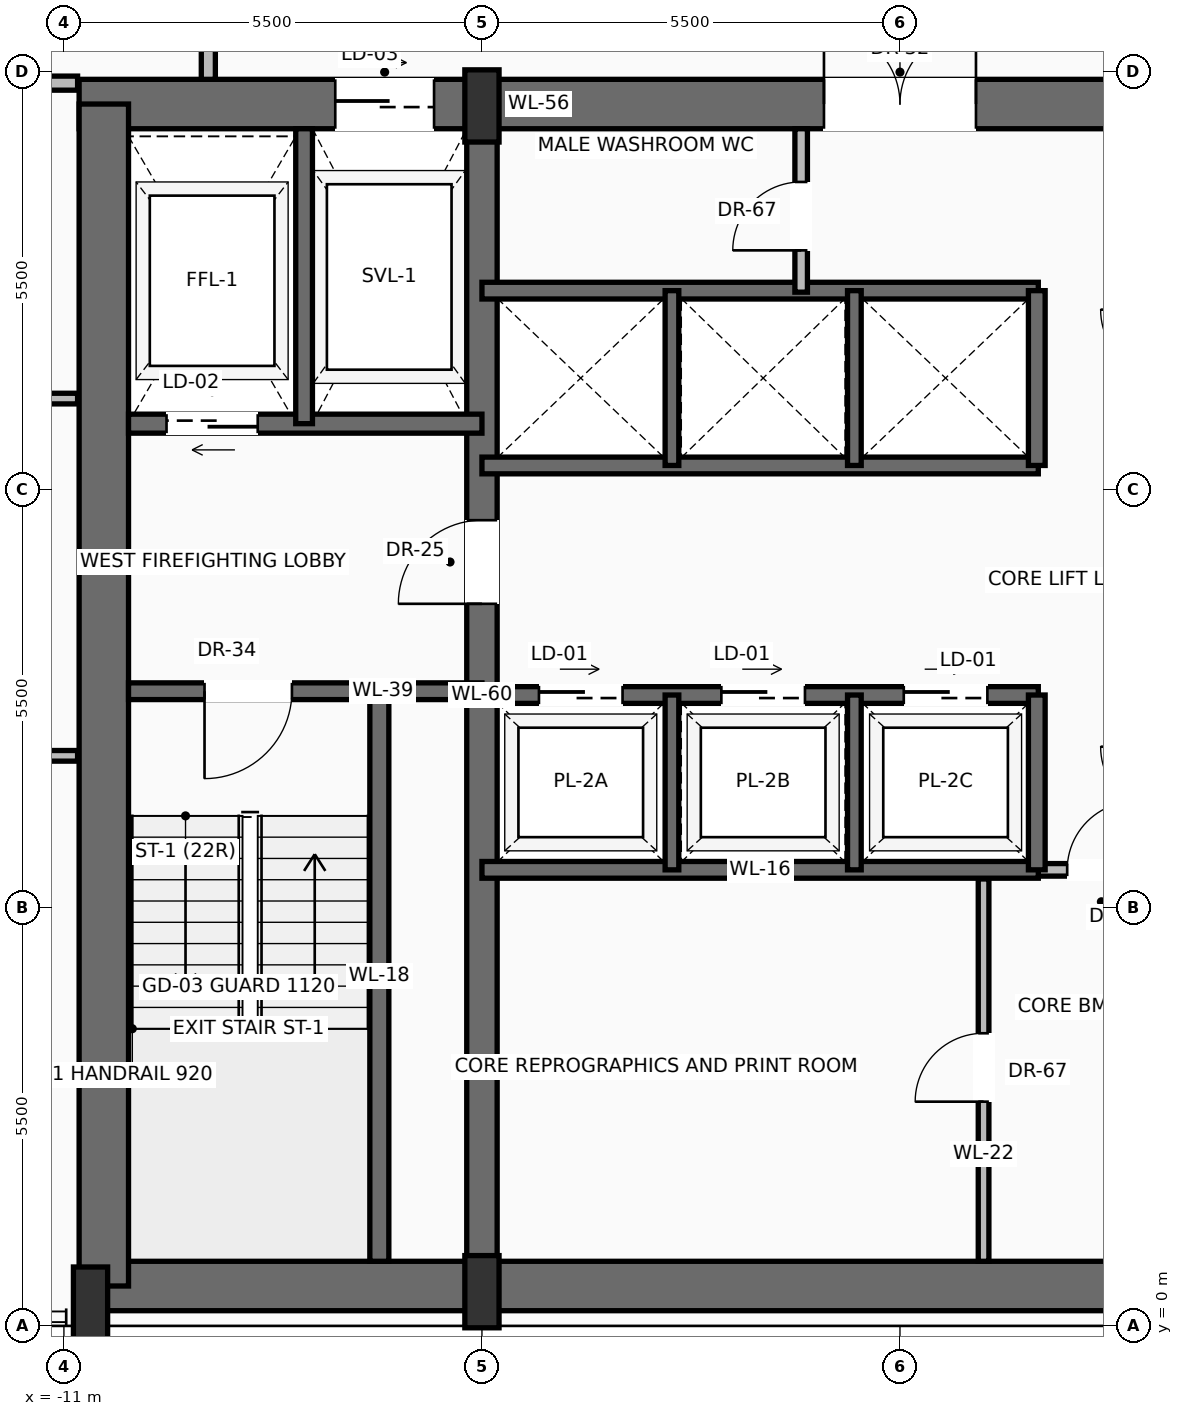
"""IFC4 building model, lengths in metres.
Left out: names, types, materials, properties, quantities, classifications, styles, units other than length and angle.
Written with IfcOpenShell. Run it as: python <this file> out.ifc"""

import sys

from ifc_helpers import new_model, si_unit, direction, frame, frame_2d, origin, origin_2d, place, context, subcontext, project, spatial, rectangle, extrude, source, transform, mapped, element, fill, save


model = new_model("IFC4")
c1 = context("Model", 3, precision=1e-05, world=origin(), true_north=direction((0.0, 1.0)))
c2 = subcontext(c1, "Body", "Model", "MODEL_VIEW")
j1 = project(units=[si_unit("LENGTHUNIT", "METRE"), si_unit("PLANEANGLEUNIT", "RADIAN")], contexts=[c1])
p1 = place(None, origin())
s1 = spatial("IfcSite", under=j1, at=p1, CompositionType="ELEMENT")
p2 = place(p1, origin())
s2 = spatial("IfcBuilding", under=s1, at=p2, CompositionType="ELEMENT")
p3 = place(p2, frame((0.0, 0.0, 147.8)))
s3 = spatial("IfcBuildingStorey", under=s2, at=p3, CompositionType="ELEMENT", Elevation=147.8)
p4 = place(p3, frame((-10.65, 0.525, 0.0), z_axis=(0.0, 0.0, 1.0), x_axis=(1.0, 0.0, 0.0)))
e1 = element("IfcWall", 1, at=p4, inside=s3, PredefinedType="SHEAR", context=c2, shape_type="SweptSolid", body=[
    extrude(rectangle(XDim=21.3, YDim=0.65, at=frame_2d((10.65, 0.0))), origin(), (0.0, 0.0, 1.0), 3.47),
])
p5 = place(p3, frame((-10.8, 16.075, 0.0), z_axis=(0.0, 0.0, 1.0), x_axis=(1.0, 0.0, 0.0)))
e2 = element("IfcWall", 2, at=p5, inside=s3, PredefinedType="SHEAR", context=c2, shape_type="SweptSolid", body=[
    extrude(rectangle(XDim=21.6, YDim=0.65, at=frame_2d((10.8, 0.0))), origin(), (0.0, 0.0, 1.0), 3.47),
])
p6 = place(p5, frame((3.37, 0.0, 0.0)))
e3 = element("IfcOpeningElement", 3, at=p6, cuts=e2, PredefinedType="OPENING", context=c2, shape_type="SweptSolid", body=[
    extrude(rectangle(XDim=1.3, YDim=2.3, at=frame_2d((0.65, 1.15))), frame((0.0, 0.335, 0.0), z_axis=(0.0, -1.0, 0.0), x_axis=(1.0, 0.0, 0.0)), (0.0, 0.0, 1.0), 0.67),
])
p7 = place(p5, frame((9.8, 0.0, 0.0)))
e4 = element("IfcOpeningElement", 4, at=p7, cuts=e2, PredefinedType="OPENING", context=c2, shape_type="SweptSolid", body=[
    extrude(rectangle(XDim=2.0, YDim=2.4, at=frame_2d((1.0, 1.2))), frame((0.0, 0.335, 0.0), z_axis=(0.0, -1.0, 0.0), x_axis=(1.0, 0.0, 0.0)), (0.0, 0.0, 1.0), 0.67),
])
p8 = place(p3, frame((-10.475, 0.525, 0.0), z_axis=(0.0, 0.0, 1.0), x_axis=(0.0, 1.0, 0.0)))
e5 = element("IfcWall", 5, at=p8, inside=s3, PredefinedType="SHEAR", context=c2, shape_type="SweptSolid", body=[
    extrude(rectangle(XDim=15.55, YDim=0.65, at=frame_2d((7.775, 0.0))), origin(), (0.0, 0.0, 1.0), 3.47),
])
p9 = place(p3, frame((-5.5, 0.525, 0.0), z_axis=(0.0, 0.0, 1.0), x_axis=(0.0, 1.0, 0.0)))
e6 = element("IfcWall", 6, at=p9, inside=s3, PredefinedType="SHEAR", context=c2, shape_type="SweptSolid", body=[
    extrude(rectangle(XDim=15.55, YDim=0.4, at=frame_2d((7.775, 0.0))), origin(), (0.0, 0.0, 1.0), 3.47),
])
p10 = place(p9, frame((8.975, 0.0, 0.0)))
e7 = element("IfcOpeningElement", 7, at=p10, cuts=e6, PredefinedType="OPENING", context=c2, shape_type="SweptSolid", body=[
    extrude(rectangle(XDim=1.1, YDim=2.2, at=frame_2d((0.55, 1.1))), frame((0.0, 0.21, 0.0), z_axis=(0.0, -1.0, 0.0), x_axis=(1.0, 0.0, 0.0)), (0.0, 0.0, 1.0), 0.42),
])
m1 = source(origin(), c2, "Body", "SweptSolid", [
    extrude(rectangle(XDim=0.45, YDim=0.95, at=origin_2d()), origin(), (0.0, 0.0, 1.0), 3.7),
])
for number, where, z_axis, x_axis in (
    (8, (-10.65, 0.3, 0.0), (0.0, 0.0, 1.0), (1.0, 0.0, 0.0)),
    (9, (-5.5, 0.45, 0.0), (0.0, 0.0, 1.0), (1.0, 0.0, 0.0)),
    (10, (-5.5, 16.05, 0.0), (0.0, 0.0, 1.0), (1.0, 0.0, 0.0)),
):
    element("IfcColumn", number, at=place(p3, frame(where, z_axis=z_axis, x_axis=x_axis)), inside=s3, PredefinedType="PILASTER", context=c2, shape_type="MappedRepresentation", body=[
        mapped(m1, transform((0.0, 0.0, 0.0), scale=1.0)),
    ])
p11 = place(p3, frame((-6.85, 0.85, 0.0), z_axis=(0.0, 0.0, 1.0), x_axis=(0.0, 1.0, 0.0)))
e11 = element("IfcWall", 11, at=p11, inside=s3, PredefinedType="SOLIDWALL", context=c2, shape_type="SweptSolid", body=[
    extrude(rectangle(XDim=7.5, YDim=0.25, at=frame_2d((3.75, 0.0))), origin(), (0.0, 0.0, 1.0), 3.47),
])
p12 = place(p3, frame((-5.5, 8.35, 0.0), z_axis=(0.0, 0.0, 1.0), x_axis=(-1.0, 0.0, 0.0)))
e12 = element("IfcWall", 12, at=p12, inside=s3, PredefinedType="SOLIDWALL", context=c2, shape_type="SweptSolid", body=[
    extrude(rectangle(XDim=4.65, YDim=0.22, at=frame_2d((2.325, 0.0))), origin(), (0.0, 0.0, 1.0), 3.47),
])
p13 = place(p12, frame((2.5, 0.0, 0.0)))
e13 = element("IfcOpeningElement", 13, at=p13, cuts=e12, PredefinedType="OPENING", context=c2, shape_type="SweptSolid", body=[
    extrude(rectangle(XDim=1.15, YDim=2.2, at=frame_2d((0.575, 1.1))), frame((0.0, 0.12, 0.0), z_axis=(0.0, -1.0, 0.0), x_axis=(1.0, 0.0, 0.0)), (0.0, 0.0, 1.0), 0.24),
])
p14 = place(p3, frame((-5.5, 11.87, 0.0), z_axis=(0.0, 0.0, 1.0), x_axis=(-1.0, 0.0, 0.0)))
e14 = element("IfcWall", 14, at=p14, inside=s3, PredefinedType="SOLIDWALL", context=c2, shape_type="SweptSolid", body=[
    extrude(rectangle(XDim=4.65, YDim=0.25, at=frame_2d((2.325, 0.0))), origin(), (0.0, 0.0, 1.0), 3.47),
])
p15 = place(p14, frame((2.95, 0.0, 0.0)))
e15 = element("IfcOpeningElement", 15, at=p15, cuts=e14, PredefinedType="OPENING", context=c2, shape_type="SweptSolid", body=[
    extrude(rectangle(XDim=1.2, YDim=2.25, at=frame_2d((0.6, 1.125))), frame((0.0, 0.135, 0.0), z_axis=(0.0, -1.0, 0.0), x_axis=(1.0, 0.0, 0.0)), (0.0, 0.0, 1.0), 0.27),
])
p16 = place(p3, frame((-7.84, 11.87, 0.0), z_axis=(0.0, 0.0, 1.0), x_axis=(0.0, 1.0, 0.0)))
e16 = element("IfcWall", 16, at=p16, inside=s3, PredefinedType="SOLIDWALL", context=c2, shape_type="SweptSolid", body=[
    extrude(rectangle(XDim=3.88, YDim=0.22, at=frame_2d((1.94, 0.0))), origin(), (0.0, 0.0, 1.0), 3.47),
])
p17 = place(p3, frame((1.82, 6.0, 0.0), z_axis=(0.0, 0.0, 1.0), x_axis=(1.0, 0.0, 0.0)))
e17 = element("IfcWall", 17, at=p17, inside=s3, PredefinedType="PARTITIONING", context=c2, shape_type="SweptSolid", body=[
    extrude(rectangle(XDim=3.48, YDim=0.165, at=frame_2d((1.74, 0.0))), origin(), (0.0, 0.0, 1.0), 3.462),
])
p18 = place(p17, frame((0.38, 0.0, 0.0)))
e18 = element("IfcOpeningElement", 18, at=p18, cuts=e17, PredefinedType="OPENING", context=c2, shape_type="SweptSolid", body=[
    extrude(rectangle(XDim=0.9, YDim=2.1, at=frame_2d((0.45, 1.05))), frame((0.0, 0.093, 0.0), z_axis=(0.0, -1.0, 0.0), x_axis=(1.0, 0.0, 0.0)), (0.0, 0.0, 1.0), 0.185),
])
p19 = place(p3, frame((1.1, 0.85, 0.0), z_axis=(0.0, 0.0, 1.0), x_axis=(0.0, 1.0, 0.0)))
e19 = element("IfcWall", 19, at=p19, inside=s3, PredefinedType="PARTITIONING", context=c2, shape_type="SweptSolid", body=[
    extrude(rectangle(XDim=5.03, YDim=0.14, at=frame_2d((2.515, 0.0))), origin(), (0.0, 0.0, 1.0), 3.462),
])
p20 = place(p19, frame((2.1, 0.0, 0.0)))
e20 = element("IfcOpeningElement", 20, at=p20, cuts=e19, PredefinedType="OPENING", context=c2, shape_type="SweptSolid", body=[
    extrude(rectangle(XDim=0.9, YDim=2.1, at=frame_2d((0.45, 1.05))), frame((0.0, 0.08, 0.0), z_axis=(0.0, -1.0, 0.0), x_axis=(1.0, 0.0, 0.0)), (0.0, 0.0, 1.0), 0.16),
])
p21 = place(p3, frame((-5.5, 6.0, 0.0), z_axis=(0.0, 0.0, 1.0), x_axis=(1.0, 0.0, 0.0)))
e21 = element("IfcWall", 21, at=p21, inside=s3, PredefinedType="SOLIDWALL", context=c2, shape_type="SweptSolid", body=[
    extrude(rectangle(XDim=7.32, YDim=0.22, at=frame_2d((3.66, 0.0))), origin(), (0.0, 0.0, 1.0), 3.47),
])
p22 = place(p3, frame((-5.5, 8.3, 0.0), z_axis=(0.0, 0.0, 1.0), x_axis=(1.0, 0.0, 0.0)))
e22 = element("IfcWall", 22, at=p22, inside=s3, PredefinedType="SOLIDWALL", context=c2, shape_type="SweptSolid", body=[
    extrude(rectangle(XDim=7.32, YDim=0.22, at=frame_2d((3.66, 0.0))), origin(), (0.0, 0.0, 1.0), 3.47),
])
p23 = place(p22, frame((0.75, 0.0, 0.0)))
e23 = element("IfcOpeningElement", 23, at=p23, cuts=e22, PredefinedType="OPENING", context=c2, shape_type="SweptSolid", body=[
    extrude(rectangle(XDim=1.1, YDim=2.2, at=frame_2d((0.55, 1.1))), frame((0.0, 0.12, 0.0), z_axis=(0.0, -1.0, 0.0), x_axis=(1.0, 0.0, 0.0)), (0.0, 0.0, 1.0), 0.24),
])
p24 = place(p22, frame((3.15, 0.0, 0.0)))
e24 = element("IfcOpeningElement", 24, at=p24, cuts=e22, PredefinedType="OPENING", context=c2, shape_type="SweptSolid", body=[
    extrude(rectangle(XDim=1.1, YDim=2.2, at=frame_2d((0.55, 1.1))), frame((0.0, 0.12, 0.0), z_axis=(0.0, -1.0, 0.0), x_axis=(1.0, 0.0, 0.0)), (0.0, 0.0, 1.0), 0.24),
])
p25 = place(p22, frame((5.55, 0.0, 0.0)))
e25 = element("IfcOpeningElement", 25, at=p25, cuts=e22, PredefinedType="OPENING", context=c2, shape_type="SweptSolid", body=[
    extrude(rectangle(XDim=1.1, YDim=2.2, at=frame_2d((0.55, 1.1))), frame((0.0, 0.12, 0.0), z_axis=(0.0, -1.0, 0.0), x_axis=(1.0, 0.0, 0.0)), (0.0, 0.0, 1.0), 0.24),
])
p26 = place(p3, frame((1.8, 6.0, 0.0), z_axis=(0.0, 0.0, 1.0), x_axis=(0.0, 1.0, 0.0)))
e26 = element("IfcWall", 26, at=p26, inside=s3, PredefinedType="SOLIDWALL", context=c2, shape_type="SweptSolid", body=[
    extrude(rectangle(XDim=2.3, YDim=0.22, at=frame_2d((1.15, 0.0))), origin(), (0.0, 0.0, 1.0), 3.47),
])
for number, where, z_axis, x_axis in (
    (27, (-3.0, 6.0, 0.0), (0.0, 0.0, 1.0), (0.0, 1.0, 0.0)),
    (28, (-0.6, 6.0, 0.0), (0.0, 0.0, 1.0), (0.0, 1.0, 0.0)),
):
    element("IfcWall", number, at=place(p3, frame(where, z_axis=z_axis, x_axis=x_axis)), inside=s3, PredefinedType="SOLIDWALL", context=c2, shape_type="SweptSolid", body=[
        extrude(rectangle(XDim=2.3, YDim=0.18, at=frame_2d((1.15, 0.0))), origin(), (0.0, 0.0, 1.0), 3.47),
    ])
for number, where, z_axis, x_axis in (
    (29, (-5.5, 11.32, 0.0), (0.0, 0.0, 1.0), (1.0, 0.0, 0.0)),
    (30, (-5.5, 13.62, 0.0), (0.0, 0.0, 1.0), (1.0, 0.0, 0.0)),
):
    element("IfcWall", number, at=place(p3, frame(where, z_axis=z_axis, x_axis=x_axis)), inside=s3, PredefinedType="SOLIDWALL", context=c2, shape_type="SweptSolid", body=[
        extrude(rectangle(XDim=7.32, YDim=0.22, at=frame_2d((3.66, 0.0))), origin(), (0.0, 0.0, 1.0), 3.47),
    ])
p27 = place(p3, frame((1.8, 11.32, 0.0), z_axis=(0.0, 0.0, 1.0), x_axis=(0.0, 1.0, 0.0)))
e31 = element("IfcWall", 31, at=p27, inside=s3, PredefinedType="SOLIDWALL", context=c2, shape_type="SweptSolid", body=[
    extrude(rectangle(XDim=2.3, YDim=0.22, at=frame_2d((1.15, 0.0))), origin(), (0.0, 0.0, 1.0), 3.47),
])
for number, where, z_axis, x_axis in (
    (32, (-3.0, 11.32, 0.0), (0.0, 0.0, 1.0), (0.0, 1.0, 0.0)),
    (33, (-0.6, 11.32, 0.0), (0.0, 0.0, 1.0), (0.0, 1.0, 0.0)),
):
    element("IfcWall", number, at=place(p3, frame(where, z_axis=z_axis, x_axis=x_axis)), inside=s3, PredefinedType="SOLIDWALL", context=c2, shape_type="SweptSolid", body=[
        extrude(rectangle(XDim=2.3, YDim=0.18, at=frame_2d((1.15, 0.0))), origin(), (0.0, 0.0, 1.0), 3.47),
    ])
p28 = place(p3, frame((-1.3, 13.6, 0.0), z_axis=(0.0, 0.0, 1.0), x_axis=(0.0, 1.0, 0.0)))
e34 = element("IfcWall", 34, at=p28, inside=s3, PredefinedType="PARTITIONING", context=c2, shape_type="SweptSolid", body=[
    extrude(rectangle(XDim=2.15, YDim=0.165, at=frame_2d((1.075, 0.0))), origin(), (0.0, 0.0, 1.0), 3.462),
])
p29 = place(p28, frame((0.55, 0.0, 0.0)))
e35 = element("IfcOpeningElement", 35, at=p29, cuts=e34, PredefinedType="OPENING", context=c2, shape_type="SweptSolid", body=[
    extrude(rectangle(XDim=0.9, YDim=2.1, at=frame_2d((0.45, 1.05))), frame((0.0, 0.093, 0.0), z_axis=(0.0, -1.0, 0.0), x_axis=(1.0, 0.0, 0.0)), (0.0, 0.0, 1.0), 0.185),
])
p30 = place(p3, frame((-9.1, 16.4, 0.0), z_axis=(0.0, 0.0, 1.0), x_axis=(0.0, 1.0, 0.0)))
e36 = element("IfcWall", 36, at=p30, inside=s3, PredefinedType="PARTITIONING", context=c2, shape_type="SweptSolid", body=[
    extrude(rectangle(XDim=8.8, YDim=0.185, at=frame_2d((4.4, 0.0))), origin(), (0.0, 0.0, 1.0), 2.846),
])
p31 = place(p30, frame((3.903, 0.0, 0.0)))
e37 = element("IfcOpeningElement", 37, at=p31, cuts=e36, PredefinedType="OPENING", context=c2, shape_type="SweptSolid", body=[
    extrude(rectangle(XDim=0.95, YDim=2.2, at=frame_2d((0.475, 1.1))), frame((0.0, 0.103, 0.0), z_axis=(0.0, -1.0, 0.0), x_axis=(1.0, 0.0, 0.0)), (0.0, 0.0, 1.0), 0.205),
])
p32 = place(p30, frame((1.487, 0.0, 0.0)))
e38 = element("IfcOpeningElement", 38, at=p32, cuts=e36, PredefinedType="OPENING", context=c2, shape_type="SweptSolid", body=[
    extrude(rectangle(XDim=0.95, YDim=2.2, at=frame_2d((0.475, 1.1))), frame((0.0, 0.103, 0.0), z_axis=(0.0, -1.0, 0.0), x_axis=(1.0, 0.0, 0.0)), (0.0, 0.0, 1.0), 0.205),
])
p33 = place(p3, frame((-21.478, 16.35, 0.0), z_axis=(0.0, 0.0, 1.0), x_axis=(1.0, 0.0, 0.0)))
e39 = element("IfcWall", 39, at=p33, inside=s3, PredefinedType="PARTITIONING", context=c2, shape_type="SweptSolid", body=[
    extrude(rectangle(XDim=10.657, YDim=0.185, at=frame_2d((5.329, 0.0))), origin(), (0.0, 0.0, 1.0), 3.462),
])
p34 = place(p33, frame((6.35, 0.0, 0.0)))
e40 = element("IfcOpeningElement", 40, at=p34, cuts=e39, PredefinedType="OPENING", context=c2, shape_type="SweptSolid", body=[
    extrude(rectangle(XDim=0.95, YDim=2.2, at=frame_2d((0.475, 1.1))), frame((0.0, 0.103, 0.0), z_axis=(0.0, -1.0, 0.0), x_axis=(1.0, 0.0, 0.0)), (0.0, 0.0, 1.0), 0.205),
])
p35 = place(p3, frame((-27.195, 7.5, 0.0), z_axis=(0.0, 0.0, 1.0), x_axis=(1.0, 0.0, 0.0)))
e41 = element("IfcWall", 41, at=p35, inside=s3, PredefinedType="PARTITIONING", context=c2, shape_type="SweptSolid", body=[
    extrude(rectangle(XDim=16.375, YDim=0.14, at=frame_2d((8.187, 0.0))), origin(), (0.0, 0.0, 1.0), 3.462),
])
p36 = place(p35, frame((7.721, 0.0, 0.0)))
e42 = element("IfcOpeningElement", 42, at=p36, cuts=e41, PredefinedType="OPENING", context=c2, shape_type="SweptSolid", body=[
    extrude(rectangle(XDim=0.95, YDim=2.2, at=frame_2d((0.475, 1.1))), frame((0.0, 0.08, 0.0), z_axis=(0.0, -1.0, 0.0), x_axis=(1.0, 0.0, 0.0)), (0.0, 0.0, 1.0), 0.16),
])
p37 = place(p3, frame((-24.158, 12.2, 0.0), z_axis=(0.0, 0.0, 1.0), x_axis=(1.0, 0.0, 0.0)))
e43 = element("IfcWall", 43, at=p37, inside=s3, PredefinedType="PARTITIONING", context=c2, shape_type="SweptSolid", body=[
    extrude(rectangle(XDim=13.338, YDim=0.14, at=frame_2d((6.669, 0.0))), origin(), (0.0, 0.0, 1.0), 3.462),
])
p38 = place(p37, frame((6.203, 0.0, 0.0)))
e44 = element("IfcOpeningElement", 44, at=p38, cuts=e43, PredefinedType="OPENING", context=c2, shape_type="SweptSolid", body=[
    extrude(rectangle(XDim=0.95, YDim=2.2, at=frame_2d((0.475, 1.1))), frame((0.0, 0.08, 0.0), z_axis=(0.0, -1.0, 0.0), x_axis=(1.0, 0.0, 0.0)), (0.0, 0.0, 1.0), 0.16),
])
m2 = source(origin(), c2, "Body", "SweptSolid", [
    extrude(rectangle(XDim=1.15, YDim=2.2, at=frame_2d((0.575, 1.1))), frame((0.0, 0.025, 0.0), z_axis=(0.0, -1.0, 0.0), x_axis=(1.0, 0.0, 0.0)), (0.0, 0.0, 1.0), 0.05),
])
p39 = place(p13, origin())
e45 = element("IfcDoor", 45, at=p39, inside=s3, OperationType="SINGLE_SWING_RIGHT", PredefinedType="DOOR", context=c2, shape_type="MappedRepresentation", body=[
    mapped(m2, transform((0.0, 0.0, 0.0), scale=1.0)),
])
fill(e13, e45)
m3 = source(origin(), c2, "Body", "SweptSolid", [
    extrude(rectangle(XDim=1.1, YDim=2.2, at=frame_2d((0.55, 1.1))), frame((0.0, 0.025, 0.0), z_axis=(0.0, -1.0, 0.0), x_axis=(1.0, 0.0, 0.0)), (0.0, 0.0, 1.0), 0.05),
])
p40 = place(p10, origin())
e46 = element("IfcDoor", 46, at=p40, inside=s3, OperationType="SINGLE_SWING_LEFT", PredefinedType="DOOR", context=c2, shape_type="MappedRepresentation", body=[
    mapped(m3, transform((0.0, 0.0, 0.0), scale=1.0)),
])
fill(e7, e46)
m4 = source(origin(), c2, "Body", "SweptSolid", [
    extrude(rectangle(XDim=1.2, YDim=2.25, at=frame_2d((0.6, 1.125))), frame((0.0, 0.025, 0.0), z_axis=(0.0, -1.0, 0.0), x_axis=(1.0, 0.0, 0.0)), (0.0, 0.0, 1.0), 0.05),
])
p41 = place(p15, origin())
e47 = element("IfcDoor", 47, at=p41, inside=s3, OperationType="SLIDING_TO_LEFT", PredefinedType="DOOR", context=c2, shape_type="MappedRepresentation", body=[
    mapped(m4, transform((0.0, 0.0, 0.0), scale=1.0)),
])
fill(e15, e47)
m5 = source(origin(), c2, "Body", "SweptSolid", [
    extrude(rectangle(XDim=1.3, YDim=2.3, at=frame_2d((0.65, 1.15))), frame((0.0, 0.025, 0.0), z_axis=(0.0, -1.0, 0.0), x_axis=(1.0, 0.0, 0.0)), (0.0, 0.0, 1.0), 0.05),
])
p42 = place(p6, origin())
e48 = element("IfcDoor", 48, at=p42, inside=s3, OperationType="SLIDING_TO_RIGHT", PredefinedType="DOOR", context=c2, shape_type="MappedRepresentation", body=[
    mapped(m5, transform((0.0, 0.0, 0.0), scale=1.0)),
])
fill(e3, e48)
m6 = source(origin(), c2, "Body", "SweptSolid", [
    extrude(rectangle(XDim=2.0, YDim=2.4, at=frame_2d((1.0, 1.2))), frame((0.0, 0.025, 0.0), z_axis=(0.0, -1.0, 0.0), x_axis=(1.0, 0.0, 0.0)), (0.0, 0.0, 1.0), 0.05),
])
p43 = place(p7, origin())
e49 = element("IfcDoor", 49, at=p43, inside=s3, OperationType="DOUBLE_DOOR_SINGLE_SWING", PredefinedType="DOOR", context=c2, shape_type="MappedRepresentation", body=[
    mapped(m6, transform((0.0, 0.0, 0.0), scale=1.0)),
])
fill(e4, e49)
m7 = source(origin(), c2, "Body", "SweptSolid", [
    extrude(rectangle(XDim=0.9, YDim=2.1, at=frame_2d((0.45, 1.05))), frame((0.0, 0.025, 0.0), z_axis=(0.0, -1.0, 0.0), x_axis=(1.0, 0.0, 0.0)), (0.0, 0.0, 1.0), 0.05),
])
p44 = place(p18, origin())
e50 = element("IfcDoor", 50, at=p44, inside=s3, OperationType="SINGLE_SWING_RIGHT", PredefinedType="DOOR", context=c2, shape_type="MappedRepresentation", body=[
    mapped(m7, transform((0.0, 0.0, 0.0), scale=1.0)),
])
fill(e18, e50)
p45 = place(p20, origin())
e51 = element("IfcDoor", 51, at=p45, inside=s3, OperationType="SINGLE_SWING_LEFT", PredefinedType="DOOR", context=c2, shape_type="MappedRepresentation", body=[
    mapped(m7, transform((0.0, 0.0, 0.0), scale=1.0)),
])
fill(e20, e51)
m8 = source(origin(), c2, "Body", "SweptSolid", [
    extrude(rectangle(XDim=1.1, YDim=2.2, at=frame_2d((0.55, 1.1))), frame((0.0, 0.025, 0.0), z_axis=(0.0, -1.0, 0.0), x_axis=(1.0, 0.0, 0.0)), (0.0, 0.0, 1.0), 0.05),
])
p46 = place(p23, origin())
e52 = element("IfcDoor", 52, at=p46, inside=s3, OperationType="SLIDING_TO_LEFT", PredefinedType="DOOR", context=c2, shape_type="MappedRepresentation", body=[
    mapped(m8, transform((0.0, 0.0, 0.0), scale=1.0)),
])
fill(e23, e52)
p47 = place(p24, origin())
e53 = element("IfcDoor", 53, at=p47, inside=s3, OperationType="SLIDING_TO_LEFT", PredefinedType="DOOR", context=c2, shape_type="MappedRepresentation", body=[
    mapped(m8, transform((0.0, 0.0, 0.0), scale=1.0)),
])
fill(e24, e53)
p48 = place(p25, origin())
e54 = element("IfcDoor", 54, at=p48, inside=s3, OperationType="SLIDING_TO_LEFT", PredefinedType="DOOR", context=c2, shape_type="MappedRepresentation", body=[
    mapped(m8, transform((0.0, 0.0, 0.0), scale=1.0)),
])
fill(e25, e54)
p49 = place(p29, origin())
e55 = element("IfcDoor", 55, at=p49, inside=s3, OperationType="SINGLE_SWING_LEFT", PredefinedType="DOOR", context=c2, shape_type="MappedRepresentation", body=[
    mapped(m7, transform((0.0, 0.0, 0.0), scale=1.0)),
])
fill(e35, e55)
save(model, sys.argv[1])
